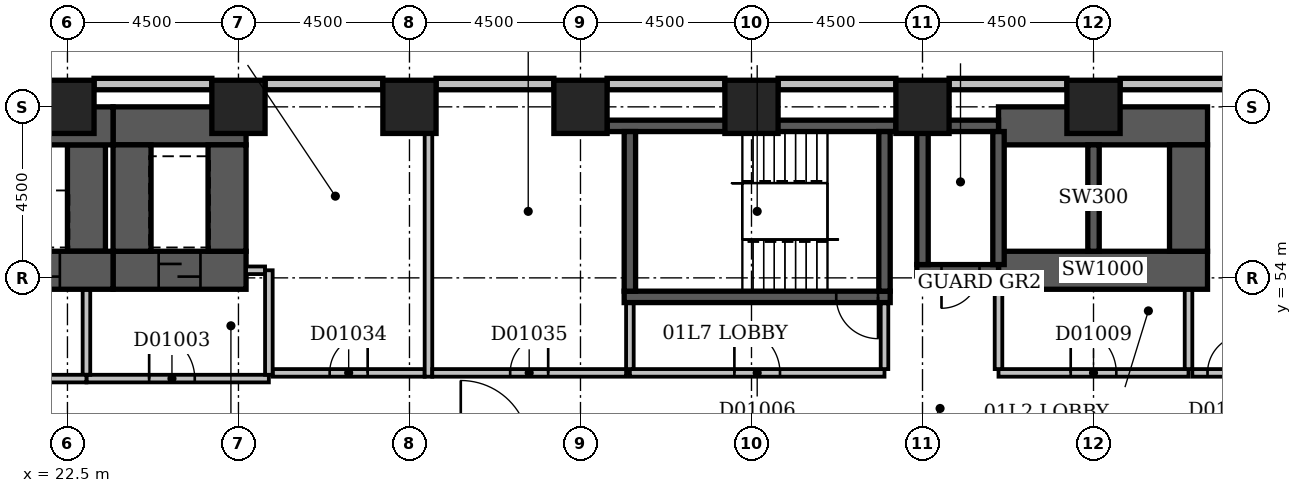
"""IFC4 building model, lengths in metres.
Left out: names, types, materials, properties, quantities, classifications, styles, units other than length and angle.
Written with IfcOpenShell. Run it as: python <this file> out.ifc"""

import sys

from ifc_helpers import new_model, si_unit, direction, frame, frame_2d, origin, origin_2d, place, context, subcontext, project, spatial, rectangle, extrude, element, fill, save


model = new_model("IFC4")
c1 = context("Model", 3, precision=1e-05, world=origin(), true_north=direction((0.0, 1.0)))
c2 = subcontext(c1, "Body", "Model", "MODEL_VIEW")
j1 = project(units=[si_unit("LENGTHUNIT", "METRE"), si_unit("PLANEANGLEUNIT", "RADIAN")], contexts=[c1])
p1 = place(None, origin())
s1 = spatial("IfcSite", under=j1, at=p1, CompositionType="ELEMENT")
p2 = place(p1, origin())
s2 = spatial("IfcBuilding", under=s1, at=p2, CompositionType="ELEMENT")
p3 = place(p2, frame((0.0, 0.0, 9.0)))
s3 = spatial("IfcBuildingStorey", under=s2, at=p3, CompositionType="ELEMENT", Elevation=9.0)
p4 = place(p3, frame((7.35, 54.2, -0.6), z_axis=(0.0, 0.0, 1.0), x_axis=(1.0, 0.0, 0.0)))
e1 = element("IfcWall", 1, at=p4, inside=s3, PredefinedType="SHEAR", context=c2, shape_type="SweptSolid", body=[
    extrude(rectangle(XDim=16.35, YDim=1.0, at=frame_2d((8.175, 0.0))), origin(), (0.0, 0.0, 1.0), 5.2),
])
p5 = place(p4, frame((1.35, 0.0, 0.6)))
e2 = element("IfcOpeningElement", 2, at=p5, cuts=e1, PredefinedType="OPENING", context=c2, shape_type="SweptSolid", body=[
    extrude(rectangle(XDim=1.1, YDim=2.1, at=frame_2d((0.55, 1.05))), frame((0.0, 0.512, 0.0), z_axis=(0.0, -1.0, 0.0), x_axis=(1.0, 0.0, 0.0)), (0.0, 0.0, 1.0), 1.024),
])
p6 = place(p4, frame((3.85, 0.0, 0.6)))
e3 = element("IfcOpeningElement", 3, at=p6, cuts=e1, PredefinedType="OPENING", context=c2, shape_type="SweptSolid", body=[
    extrude(rectangle(XDim=1.1, YDim=2.1, at=frame_2d((0.55, 1.05))), frame((0.0, 0.512, 0.0), z_axis=(0.0, -1.0, 0.0), x_axis=(1.0, 0.0, 0.0)), (0.0, 0.0, 1.0), 1.024),
])
p7 = place(p4, frame((6.35, 0.0, 0.6)))
e4 = element("IfcOpeningElement", 4, at=p7, cuts=e1, PredefinedType="OPENING", context=c2, shape_type="SweptSolid", body=[
    extrude(rectangle(XDim=1.1, YDim=2.1, at=frame_2d((0.55, 1.05))), frame((0.0, 0.512, 0.0), z_axis=(0.0, -1.0, 0.0), x_axis=(1.0, 0.0, 0.0)), (0.0, 0.0, 1.0), 1.024),
])
p8 = place(p4, frame((8.85, 0.0, 0.6)))
e5 = element("IfcOpeningElement", 5, at=p8, cuts=e1, PredefinedType="OPENING", context=c2, shape_type="SweptSolid", body=[
    extrude(rectangle(XDim=1.1, YDim=2.1, at=frame_2d((0.55, 1.05))), frame((0.0, 0.512, 0.0), z_axis=(0.0, -1.0, 0.0), x_axis=(1.0, 0.0, 0.0)), (0.0, 0.0, 1.0), 1.024),
])
p9 = place(p4, frame((11.35, 0.0, 0.6)))
e6 = element("IfcOpeningElement", 6, at=p9, cuts=e1, PredefinedType="OPENING", context=c2, shape_type="SweptSolid", body=[
    extrude(rectangle(XDim=1.1, YDim=2.1, at=frame_2d((0.55, 1.05))), frame((0.0, 0.512, 0.0), z_axis=(0.0, -1.0, 0.0), x_axis=(1.0, 0.0, 0.0)), (0.0, 0.0, 1.0), 1.024),
])
p10 = place(p4, frame((13.85, 0.0, 0.6)))
e7 = element("IfcOpeningElement", 7, at=p10, cuts=e1, PredefinedType="OPENING", context=c2, shape_type="SweptSolid", body=[
    extrude(rectangle(XDim=1.1, YDim=2.1, at=frame_2d((0.55, 1.05))), frame((0.0, 0.512, 0.0), z_axis=(0.0, -1.0, 0.0), x_axis=(1.0, 0.0, 0.0)), (0.0, 0.0, 1.0), 1.024),
])
p11 = place(p3, frame((7.35, 58.0, -0.6), z_axis=(0.0, 0.0, 1.0), x_axis=(1.0, 0.0, 0.0)))
e8 = element("IfcWall", 8, at=p11, inside=s3, PredefinedType="SHEAR", context=c2, shape_type="SweptSolid", body=[
    extrude(rectangle(XDim=16.35, YDim=1.0, at=frame_2d((8.175, 0.0))), origin(), (0.0, 0.0, 1.0), 5.2),
])
p12 = place(p3, frame((23.0, 54.7, -0.6), z_axis=(0.0, 0.0, 1.0), x_axis=(0.0, 1.0, 0.0)))
e9 = element("IfcWall", 9, at=p12, inside=s3, PredefinedType="SHEAR", context=c2, shape_type="SweptSolid", body=[
    extrude(rectangle(XDim=2.8, YDim=1.0, at=frame_2d((1.4, 0.0))), origin(), (0.0, 0.0, 1.0), 5.2),
])
p13 = place(p3, frame((23.7, 54.2, -0.6), z_axis=(0.0, 0.0, 1.0), x_axis=(1.0, 0.0, 0.0)))
e10 = element("IfcWall", 10, at=p13, inside=s3, PredefinedType="SHEAR", context=c2, shape_type="SweptSolid", body=[
    extrude(rectangle(XDim=3.5, YDim=1.0, at=frame_2d((1.75, 0.0))), origin(), (0.0, 0.0, 1.0), 5.2),
])
p14 = place(p13, frame((1.2, 0.0, 0.6)))
e11 = element("IfcOpeningElement", 11, at=p14, cuts=e10, PredefinedType="OPENING", context=c2, shape_type="SweptSolid", body=[
    extrude(rectangle(XDim=1.1, YDim=2.1, at=frame_2d((0.55, 1.05))), frame((0.0, 0.512, 0.0), z_axis=(0.0, -1.0, 0.0), x_axis=(1.0, 0.0, 0.0)), (0.0, 0.0, 1.0), 1.024),
])
p15 = place(p3, frame((23.7, 58.0, -0.6), z_axis=(0.0, 0.0, 1.0), x_axis=(1.0, 0.0, 0.0)))
e12 = element("IfcWall", 12, at=p15, inside=s3, PredefinedType="SHEAR", context=c2, shape_type="SweptSolid", body=[
    extrude(rectangle(XDim=3.5, YDim=1.0, at=frame_2d((1.75, 0.0))), origin(), (0.0, 0.0, 1.0), 5.2),
])
for number, where, z_axis, x_axis in (
    (13, (24.2, 54.7, -0.6), (0.0, 0.0, 1.0), (0.0, 1.0, 0.0)),
    (14, (26.7, 54.7, -0.6), (0.0, 0.0, 1.0), (0.0, 1.0, 0.0)),
):
    element("IfcWall", number, at=place(p3, frame(where, z_axis=z_axis, x_axis=x_axis)), inside=s3, PredefinedType="SHEAR", context=c2, shape_type="SweptSolid", body=[
        extrude(rectangle(XDim=2.8, YDim=1.0, at=frame_2d((1.4, 0.0))), origin(), (0.0, 0.0, 1.0), 5.2),
    ])
p16 = place(p3, frame((36.7, 58.0, -0.6), z_axis=(0.0, 0.0, 1.0), x_axis=(1.0, 0.0, 0.0)))
e15 = element("IfcWall", 15, at=p16, inside=s3, PredefinedType="SHEAR", context=c2, shape_type="SweptSolid", body=[
    extrude(rectangle(XDim=7.6, YDim=0.3, at=frame_2d((3.8, 0.0))), origin(), (0.0, 0.0, 1.0), 5.2),
])
p17 = place(p3, frame((37.15, 53.5, -0.6), z_axis=(0.0, 0.0, 1.0), x_axis=(1.0, 0.0, 0.0)))
e16 = element("IfcWall", 16, at=p17, inside=s3, PredefinedType="SHEAR", context=c2, shape_type="SweptSolid", body=[
    extrude(rectangle(XDim=7.0, YDim=0.3, at=frame_2d((3.5, 0.0))), origin(), (0.0, 0.0, 1.0), 5.2),
])
p18 = place(p17, frame((5.58, 0.0, 0.6)))
e17 = element("IfcOpeningElement", 17, at=p18, cuts=e16, PredefinedType="OPENING", context=c2, shape_type="SweptSolid", body=[
    extrude(rectangle(XDim=1.1, YDim=2.1, at=frame_2d((0.55, 1.05))), frame((0.0, 0.162, 0.0), z_axis=(0.0, -1.0, 0.0), x_axis=(1.0, 0.0, 0.0)), (0.0, 0.0, 1.0), 0.324),
])
for number, where, z_axis, x_axis in (
    (18, (37.3, 53.65, -0.6), (0.0, 0.0, 1.0), (0.0, 1.0, 0.0)),
    (19, (44.0, 53.65, -0.6), (0.0, 0.0, 1.0), (0.0, 1.0, 0.0)),
):
    element("IfcWall", number, at=place(p3, frame(where, z_axis=z_axis, x_axis=x_axis)), inside=s3, PredefinedType="SHEAR", context=c2, shape_type="SweptSolid", body=[
        extrude(rectangle(XDim=4.2, YDim=0.3, at=frame_2d((2.1, 0.0))), origin(), (0.0, 0.0, 1.0), 5.2),
    ])
p19 = place(p3, frame((44.85, 54.2, -0.6), z_axis=(0.0, 0.0, 1.0), x_axis=(1.0, 0.0, 0.0)))
e20 = element("IfcWall", 20, at=p19, inside=s3, PredefinedType="SHEAR", context=c2, shape_type="SweptSolid", body=[
    extrude(rectangle(XDim=2.15, YDim=0.3, at=frame_2d((1.075, 0.0))), origin(), (0.0, 0.0, 1.0), 5.2),
])
p20 = place(p19, frame((0.65, 0.0, 0.6)))
e21 = element("IfcOpeningElement", 21, at=p20, cuts=e20, PredefinedType="OPENING", context=c2, shape_type="SweptSolid", body=[
    extrude(rectangle(XDim=1.0, YDim=2.1, at=frame_2d((0.5, 1.05))), frame((0.0, 0.162, 0.0), z_axis=(0.0, -1.0, 0.0), x_axis=(1.0, 0.0, 0.0)), (0.0, 0.0, 1.0), 0.324),
])
p21 = place(p3, frame((44.85, 58.0, -0.6), z_axis=(0.0, 0.0, 1.0), x_axis=(1.0, 0.0, 0.0)))
e22 = element("IfcWall", 22, at=p21, inside=s3, PredefinedType="SHEAR", context=c2, shape_type="SweptSolid", body=[
    extrude(rectangle(XDim=2.15, YDim=0.3, at=frame_2d((1.075, 0.0))), origin(), (0.0, 0.0, 1.0), 5.2),
])
p22 = place(p3, frame((45.0, 54.35, -0.6), z_axis=(0.0, 0.0, 1.0), x_axis=(0.0, 1.0, 0.0)))
e23 = element("IfcWall", 23, at=p22, inside=s3, PredefinedType="SHEAR", context=c2, shape_type="SweptSolid", body=[
    extrude(rectangle(XDim=3.5, YDim=0.3, at=frame_2d((1.75, 0.0))), origin(), (0.0, 0.0, 1.0), 5.2),
])
p23 = place(p3, frame((47.0, 54.2, -0.6), z_axis=(0.0, 0.0, 1.0), x_axis=(1.0, 0.0, 0.0)))
e24 = element("IfcWall", 24, at=p23, inside=s3, PredefinedType="SHEAR", context=c2, shape_type="SweptSolid", body=[
    extrude(rectangle(XDim=5.5, YDim=1.0, at=frame_2d((2.75, 0.0))), origin(), (0.0, 0.0, 1.0), 5.2),
])
p24 = place(p3, frame((47.0, 54.35, -0.6), z_axis=(0.0, 0.0, 1.0), x_axis=(0.0, 1.0, 0.0)))
e25 = element("IfcWall", 25, at=p24, inside=s3, PredefinedType="SHEAR", context=c2, shape_type="SweptSolid", body=[
    extrude(rectangle(XDim=3.5, YDim=0.3, at=frame_2d((1.75, 0.0))), origin(), (0.0, 0.0, 1.0), 5.2),
])
p25 = place(p3, frame((47.0, 58.0, -0.6), z_axis=(0.0, 0.0, 1.0), x_axis=(1.0, 0.0, 0.0)))
e26 = element("IfcWall", 26, at=p25, inside=s3, PredefinedType="SHEAR", context=c2, shape_type="SweptSolid", body=[
    extrude(rectangle(XDim=5.5, YDim=1.0, at=frame_2d((2.75, 0.0))), origin(), (0.0, 0.0, 1.0), 5.2),
])
p26 = place(p3, frame((49.5, 54.7, -0.6), z_axis=(0.0, 0.0, 1.0), x_axis=(0.0, 1.0, 0.0)))
e27 = element("IfcWall", 27, at=p26, inside=s3, PredefinedType="SHEAR", context=c2, shape_type="SweptSolid", body=[
    extrude(rectangle(XDim=2.8, YDim=0.3, at=frame_2d((1.4, 0.0))), origin(), (0.0, 0.0, 1.0), 5.2),
])
p27 = place(p3, frame((52.0, 54.7, -0.6), z_axis=(0.0, 0.0, 1.0), x_axis=(0.0, 1.0, 0.0)))
e28 = element("IfcWall", 28, at=p27, inside=s3, PredefinedType="SHEAR", context=c2, shape_type="SweptSolid", body=[
    extrude(rectangle(XDim=2.8, YDim=1.0, at=frame_2d((1.4, 0.0))), origin(), (0.0, 0.0, 1.0), 5.2),
])
for number, where, z_axis, x_axis in (
    (29, (22.5, 58.5, -0.6), (0.0, 0.0, 1.0), (1.0, 0.0, 0.0)),
    (30, (27.0, 58.5, -0.6), (0.0, 0.0, 1.0), (1.0, 0.0, 0.0)),
    (31, (31.5, 58.5, -0.6), (0.0, 0.0, 1.0), (1.0, 0.0, 0.0)),
    (32, (36.0, 58.5, -0.6), (0.0, 0.0, 1.0), (1.0, 0.0, 0.0)),
    (33, (40.5, 58.5, -0.6), (0.0, 0.0, 1.0), (1.0, 0.0, 0.0)),
    (34, (45.0, 58.5, -0.6), (0.0, 0.0, 1.0), (1.0, 0.0, 0.0)),
    (35, (49.5, 58.5, -0.6), (0.0, 0.0, 1.0), (1.0, 0.0, 0.0)),
):
    element("IfcColumn", number, at=place(p3, frame(where, z_axis=z_axis, x_axis=x_axis)), inside=s3, PredefinedType="COLUMN", context=c2, shape_type="SweptSolid", body=[
        extrude(rectangle(XDim=1.4, YDim=1.4, at=origin_2d()), origin(), (0.0, 0.0, 1.0), 5.2),
    ])
for number, where, z_axis, x_axis in (
    (36, (53.3, 59.1, 0.0), (0.0, 0.0, 1.0), (-1.0, 0.0, 0.0)),
    (37, (48.8, 59.1, 0.0), (0.0, 0.0, 1.0), (-1.0, 0.0, 0.0)),
    (38, (44.3, 59.1, 0.0), (0.0, 0.0, 1.0), (-1.0, 0.0, 0.0)),
    (39, (39.8, 59.1, 0.0), (0.0, 0.0, 1.0), (-1.0, 0.0, 0.0)),
    (40, (35.3, 59.1, 0.0), (0.0, 0.0, 1.0), (-1.0, 0.0, 0.0)),
    (41, (30.8, 59.1, 0.0), (0.0, 0.0, 1.0), (-1.0, 0.0, 0.0)),
    (42, (26.3, 59.1, 0.0), (0.0, 0.0, 1.0), (-1.0, 0.0, 0.0)),
):
    element("IfcWall", number, at=place(p3, frame(where, z_axis=z_axis, x_axis=x_axis)), inside=s3, PredefinedType="STANDARD", context=c2, shape_type="SweptSolid", body=[
        extrude(rectangle(XDim=3.1, YDim=0.3, at=frame_2d((1.55, 0.0))), origin(), (0.0, 0.0, 1.0), 3.9),
    ])
p28 = place(p3, frame((8.0, 51.35, 0.0), z_axis=(0.0, 0.0, 1.0), x_axis=(1.0, 0.0, 0.0)))
e43 = element("IfcWall", 43, at=p28, inside=s3, PredefinedType="PARTITIONING", context=c2, shape_type="SweptSolid", body=[
    extrude(rectangle(XDim=15.0, YDim=0.2, at=frame_2d((7.5, 0.0))), origin(), (0.0, 0.0, 1.0), 4.6),
])
p29 = place(p28, frame((3.4, 0.0, 0.0)))
e44 = element("IfcOpeningElement", 44, at=p29, cuts=e43, PredefinedType="OPENING", context=c2, shape_type="SweptSolid", body=[
    extrude(rectangle(XDim=1.2, YDim=2.1, at=frame_2d((0.6, 1.05))), frame((0.0, 0.112, 0.0), z_axis=(0.0, -1.0, 0.0), x_axis=(1.0, 0.0, 0.0)), (0.0, 0.0, 1.0), 0.224),
])
p30 = place(p28, frame((9.4, 0.0, 0.0)))
e45 = element("IfcOpeningElement", 45, at=p30, cuts=e43, PredefinedType="OPENING", context=c2, shape_type="SweptSolid", body=[
    extrude(rectangle(XDim=1.2, YDim=2.1, at=frame_2d((0.6, 1.05))), frame((0.0, 0.112, 0.0), z_axis=(0.0, -1.0, 0.0), x_axis=(1.0, 0.0, 0.0)), (0.0, 0.0, 1.0), 0.224),
])
p31 = place(p3, frame((23.0, 51.45, 0.0), z_axis=(0.0, 0.0, 1.0), x_axis=(0.0, 1.0, 0.0)))
e46 = element("IfcWall", 46, at=p31, inside=s3, PredefinedType="PARTITIONING", context=c2, shape_type="SweptSolid", body=[
    extrude(rectangle(XDim=2.23, YDim=0.2, at=frame_2d((1.115, 0.0))), origin(), (0.0, 0.0, 1.0), 4.6),
])
p32 = place(p3, frame((47.0, 51.5, 0.0), z_axis=(0.0, 0.0, 1.0), x_axis=(1.0, 0.0, 0.0)))
e47 = element("IfcWall", 47, at=p32, inside=s3, PredefinedType="PARTITIONING", context=c2, shape_type="SweptSolid", body=[
    extrude(rectangle(XDim=5.0, YDim=0.2, at=frame_2d((2.5, 0.0))), origin(), (0.0, 0.0, 1.0), 4.6),
])
p33 = place(p32, frame((1.9, 0.0, 0.0)))
e48 = element("IfcOpeningElement", 48, at=p33, cuts=e47, PredefinedType="OPENING", context=c2, shape_type="SweptSolid", body=[
    extrude(rectangle(XDim=1.2, YDim=2.1, at=frame_2d((0.6, 1.05))), frame((0.0, 0.112, 0.0), z_axis=(0.0, -1.0, 0.0), x_axis=(1.0, 0.0, 0.0)), (0.0, 0.0, 1.0), 0.224),
])
for number, where, z_axis, x_axis in (
    (49, (52.0, 51.6, 0.0), (0.0, 0.0, 1.0), (0.0, 1.0, 0.0)),
    (50, (47.0, 51.6, 0.0), (0.0, 0.0, 1.0), (0.0, 1.0, 0.0)),
):
    element("IfcWall", number, at=place(p3, frame(where, z_axis=z_axis, x_axis=x_axis)), inside=s3, PredefinedType="PARTITIONING", context=c2, shape_type="SweptSolid", body=[
        extrude(rectangle(XDim=2.08, YDim=0.2, at=frame_2d((1.04, 0.0))), origin(), (0.0, 0.0, 1.0), 4.6),
    ])
p34 = place(p3, frame((23.0, 51.35, 0.0), z_axis=(0.0, 0.0, 1.0), x_axis=(1.0, 0.0, 0.0)))
e51 = element("IfcWall", 51, at=p34, inside=s3, PredefinedType="PARTITIONING", context=c2, shape_type="SweptSolid", body=[
    extrude(rectangle(XDim=4.8, YDim=0.2, at=frame_2d((2.4, 0.0))), origin(), (0.0, 0.0, 1.0), 4.6),
])
p35 = place(p34, frame((1.65, 0.0, 0.0)))
e52 = element("IfcOpeningElement", 52, at=p35, cuts=e51, PredefinedType="OPENING", context=c2, shape_type="SweptSolid", body=[
    extrude(rectangle(XDim=1.2, YDim=2.1, at=frame_2d((0.6, 1.05))), frame((0.0, 0.112, 0.0), z_axis=(0.0, -1.0, 0.0), x_axis=(1.0, 0.0, 0.0)), (0.0, 0.0, 1.0), 0.224),
])
p36 = place(p3, frame((27.8, 51.45, 0.0), z_axis=(0.0, 0.0, 1.0), x_axis=(0.0, 1.0, 0.0)))
e53 = element("IfcWall", 53, at=p36, inside=s3, PredefinedType="PARTITIONING", context=c2, shape_type="SweptSolid", body=[
    extrude(rectangle(XDim=2.75, YDim=0.2, at=frame_2d((1.375, 0.0))), origin(), (0.0, 0.0, 1.0), 4.6),
])
p37 = place(p3, frame((27.2, 54.2, 0.0), z_axis=(0.0, 0.0, 1.0), x_axis=(1.0, 0.0, 0.0)))
e54 = element("IfcWall", 54, at=p37, inside=s3, PredefinedType="PARTITIONING", context=c2, shape_type="SweptSolid", body=[
    extrude(rectangle(XDim=0.5, YDim=0.2, at=frame_2d((0.25, 0.0))), origin(), (0.0, 0.0, 1.0), 4.6),
])
p38 = place(p3, frame((37.3, 51.5, 0.0), z_axis=(0.0, 0.0, 1.0), x_axis=(1.0, 0.0, 0.0)))
e55 = element("IfcWall", 55, at=p38, inside=s3, PredefinedType="PARTITIONING", context=c2, shape_type="SweptSolid", body=[
    extrude(rectangle(XDim=6.7, YDim=0.2, at=frame_2d((3.35, 0.0))), origin(), (0.0, 0.0, 1.0), 4.6),
])
p39 = place(p38, frame((2.75, 0.0, 0.0)))
e56 = element("IfcOpeningElement", 56, at=p39, cuts=e55, PredefinedType="OPENING", context=c2, shape_type="SweptSolid", body=[
    extrude(rectangle(XDim=1.2, YDim=2.1, at=frame_2d((0.6, 1.05))), frame((0.0, 0.112, 0.0), z_axis=(0.0, -1.0, 0.0), x_axis=(1.0, 0.0, 0.0)), (0.0, 0.0, 1.0), 0.224),
])
for number, where, z_axis, x_axis in (
    (57, (44.0, 51.6, 0.0), (0.0, 0.0, 1.0), (0.0, 1.0, 0.0)),
    (58, (37.3, 51.6, 0.0), (0.0, 0.0, 1.0), (0.0, 1.0, 0.0)),
):
    element("IfcWall", number, at=place(p3, frame(where, z_axis=z_axis, x_axis=x_axis)), inside=s3, PredefinedType="PARTITIONING", context=c2, shape_type="SweptSolid", body=[
        extrude(rectangle(XDim=1.73, YDim=0.2, at=frame_2d((0.865, 0.0))), origin(), (0.0, 0.0, 1.0), 4.6),
    ])
p40 = place(p3, frame((31.9, 51.5, 0.0), z_axis=(0.0, 0.0, 1.0), x_axis=(-1.0, 0.0, 0.0)))
e59 = element("IfcWall", 59, at=p40, inside=s3, PredefinedType="PARTITIONING", context=c2, shape_type="SweptSolid", body=[
    extrude(rectangle(XDim=4.0, YDim=0.2, at=frame_2d((2.0, 0.0))), origin(), (0.0, 0.0, 1.0), 4.6),
])
p41 = place(p40, frame((1.5, 0.0, 0.0)))
e60 = element("IfcOpeningElement", 60, at=p41, cuts=e59, PredefinedType="OPENING", context=c2, shape_type="SweptSolid", body=[
    extrude(rectangle(XDim=1.0, YDim=2.1, at=frame_2d((0.5, 1.05))), frame((0.0, 0.112, 0.0), z_axis=(0.0, -1.0, 0.0), x_axis=(1.0, 0.0, 0.0)), (0.0, 0.0, 1.0), 0.224),
])
p42 = place(p3, frame((37.2, 51.5, 0.0), z_axis=(0.0, 0.0, 1.0), x_axis=(-1.0, 0.0, 0.0)))
e61 = element("IfcWall", 61, at=p42, inside=s3, PredefinedType="PARTITIONING", context=c2, shape_type="SweptSolid", body=[
    extrude(rectangle(XDim=5.1, YDim=0.2, at=frame_2d((2.55, 0.0))), origin(), (0.0, 0.0, 1.0), 4.6),
])
p43 = place(p42, frame((2.05, 0.0, 0.0)))
e62 = element("IfcOpeningElement", 62, at=p43, cuts=e61, PredefinedType="OPENING", context=c2, shape_type="SweptSolid", body=[
    extrude(rectangle(XDim=1.0, YDim=2.1, at=frame_2d((0.5, 1.05))), frame((0.0, 0.112, 0.0), z_axis=(0.0, -1.0, 0.0), x_axis=(1.0, 0.0, 0.0)), (0.0, 0.0, 1.0), 0.224),
])
p44 = place(p3, frame((53.9, 51.5, 0.0), z_axis=(0.0, 0.0, 1.0), x_axis=(-1.0, 0.0, 0.0)))
e63 = element("IfcWall", 63, at=p44, inside=s3, PredefinedType="PARTITIONING", context=c2, shape_type="SweptSolid", body=[
    extrude(rectangle(XDim=1.8, YDim=0.2, at=frame_2d((0.9, 0.0))), origin(), (0.0, 0.0, 1.0), 4.6),
])
p45 = place(p44, frame((0.4, 0.0, 0.0)))
e64 = element("IfcOpeningElement", 64, at=p45, cuts=e63, PredefinedType="OPENING", context=c2, shape_type="SweptSolid", body=[
    extrude(rectangle(XDim=1.0, YDim=2.1, at=frame_2d((0.5, 1.05))), frame((0.0, 0.112, 0.0), z_axis=(0.0, -1.0, 0.0), x_axis=(1.0, 0.0, 0.0)), (0.0, 0.0, 1.0), 0.224),
])
p46 = place(p3, frame((32.0, 58.5, 0.0), z_axis=(0.0, 0.0, 1.0), x_axis=(0.0, -1.0, 0.0)))
e65 = element("IfcWall", 65, at=p46, inside=s3, PredefinedType="PARTITIONING", context=c2, shape_type="SweptSolid", body=[
    extrude(rectangle(XDim=7.1, YDim=0.2, at=frame_2d((3.55, 0.0))), origin(), (0.0, 0.0, 1.0), 4.6),
])
p47 = place(p35, origin())
e66 = element("IfcDoor", 66, at=p47, inside=s3, OperationType="SINGLE_SWING_LEFT", PredefinedType="DOOR", context=c2, shape_type="SweptSolid", body=[
    extrude(rectangle(XDim=1.2, YDim=2.1, at=frame_2d((0.6, 1.05))), frame((0.0, 0.025, 0.0), z_axis=(0.0, -1.0, 0.0), x_axis=(1.0, 0.0, 0.0)), (0.0, 0.0, 1.0), 0.05),
])
fill(e52, e66)
p48 = place(p14, origin())
e67 = element("IfcDoor", 67, at=p48, inside=s3, OperationType="SLIDING_TO_LEFT", PredefinedType="DOOR", context=c2, shape_type="SweptSolid", body=[
    extrude(rectangle(XDim=1.1, YDim=2.1, at=frame_2d((0.55, 1.05))), frame((0.0, 0.025, 0.0), z_axis=(0.0, -1.0, 0.0), x_axis=(1.0, 0.0, 0.0)), (0.0, 0.0, 1.0), 0.05),
])
fill(e11, e67)
p49 = place(p10, origin())
e68 = element("IfcDoor", 68, at=p49, inside=s3, OperationType="SLIDING_TO_LEFT", PredefinedType="DOOR", context=c2, shape_type="SweptSolid", body=[
    extrude(rectangle(XDim=1.1, YDim=2.1, at=frame_2d((0.55, 1.05))), frame((0.0, 0.025, 0.0), z_axis=(0.0, -1.0, 0.0), x_axis=(1.0, 0.0, 0.0)), (0.0, 0.0, 1.0), 0.05),
])
fill(e7, e68)
p50 = place(p39, origin())
e69 = element("IfcDoor", 69, at=p50, inside=s3, OperationType="SINGLE_SWING_LEFT", PredefinedType="DOOR", context=c2, shape_type="SweptSolid", body=[
    extrude(rectangle(XDim=1.2, YDim=2.1, at=frame_2d((0.6, 1.05))), frame((0.0, 0.025, 0.0), z_axis=(0.0, -1.0, 0.0), x_axis=(1.0, 0.0, 0.0)), (0.0, 0.0, 1.0), 0.05),
])
fill(e56, e69)
p51 = place(p33, origin())
e70 = element("IfcDoor", 70, at=p51, inside=s3, OperationType="SINGLE_SWING_LEFT", PredefinedType="DOOR", context=c2, shape_type="SweptSolid", body=[
    extrude(rectangle(XDim=1.2, YDim=2.1, at=frame_2d((0.6, 1.05))), frame((0.0, 0.025, 0.0), z_axis=(0.0, -1.0, 0.0), x_axis=(1.0, 0.0, 0.0)), (0.0, 0.0, 1.0), 0.05),
])
fill(e48, e70)
p52 = place(p20, frame((1.0, 0.0, 0.0), z_axis=(0.0, 0.0, 1.0), x_axis=(-1.0, 0.0, 0.0)))
e71 = element("IfcDoor", 71, at=p52, inside=s3, OperationType="SINGLE_SWING_RIGHT", PredefinedType="DOOR", context=c2, shape_type="SweptSolid", body=[
    extrude(rectangle(XDim=1.0, YDim=2.1, at=frame_2d((0.5, 1.05))), frame((0.0, 0.025, 0.0), z_axis=(0.0, -1.0, 0.0), x_axis=(1.0, 0.0, 0.0)), (0.0, 0.0, 1.0), 0.05),
])
fill(e21, e71)
p53 = place(p18, origin())
e72 = element("IfcDoor", 72, at=p53, inside=s3, OperationType="SINGLE_SWING_RIGHT", PredefinedType="DOOR", context=c2, shape_type="SweptSolid", body=[
    extrude(rectangle(XDim=1.1, YDim=2.1, at=frame_2d((0.55, 1.05))), frame((0.0, 0.025, 0.0), z_axis=(0.0, -1.0, 0.0), x_axis=(1.0, 0.0, 0.0)), (0.0, 0.0, 1.0), 0.05),
])
fill(e17, e72)
p54 = place(p41, frame((1.0, 0.0, 0.0), z_axis=(0.0, 0.0, 1.0), x_axis=(-1.0, 0.0, 0.0)))
e73 = element("IfcDoor", 73, at=p54, inside=s3, OperationType="SINGLE_SWING_RIGHT", PredefinedType="DOOR", context=c2, shape_type="SweptSolid", body=[
    extrude(rectangle(XDim=1.0, YDim=2.1, at=frame_2d((0.5, 1.05))), frame((0.0, 0.025, 0.0), z_axis=(0.0, -1.0, 0.0), x_axis=(1.0, 0.0, 0.0)), (0.0, 0.0, 1.0), 0.05),
])
fill(e60, e73)
p55 = place(p43, frame((1.0, 0.0, 0.0), z_axis=(0.0, 0.0, 1.0), x_axis=(-1.0, 0.0, 0.0)))
e74 = element("IfcDoor", 74, at=p55, inside=s3, OperationType="SINGLE_SWING_RIGHT", PredefinedType="DOOR", context=c2, shape_type="SweptSolid", body=[
    extrude(rectangle(XDim=1.0, YDim=2.1, at=frame_2d((0.5, 1.05))), frame((0.0, 0.025, 0.0), z_axis=(0.0, -1.0, 0.0), x_axis=(1.0, 0.0, 0.0)), (0.0, 0.0, 1.0), 0.05),
])
fill(e62, e74)
p56 = place(p45, frame((1.0, 0.0, 0.0), z_axis=(0.0, 0.0, 1.0), x_axis=(-1.0, 0.0, 0.0)))
e75 = element("IfcDoor", 75, at=p56, inside=s3, OperationType="SINGLE_SWING_RIGHT", PredefinedType="DOOR", context=c2, shape_type="SweptSolid", body=[
    extrude(rectangle(XDim=1.0, YDim=2.1, at=frame_2d((0.5, 1.05))), frame((0.0, 0.025, 0.0), z_axis=(0.0, -1.0, 0.0), x_axis=(1.0, 0.0, 0.0)), (0.0, 0.0, 1.0), 0.05),
])
fill(e64, e75)
save(model, sys.argv[1])
